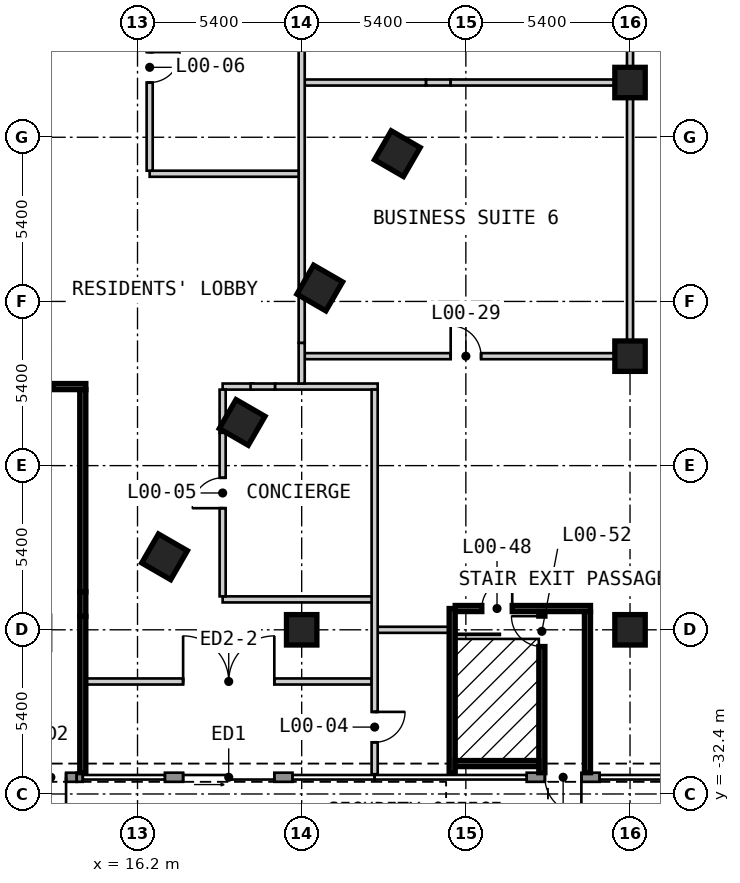
"""IFC4 building model, lengths in metres.
Left out: names, types, materials, properties, quantities, classifications, styles, units other than length and angle.
Written with IfcOpenShell. Run it as: python <this file> out.ifc"""

import sys

from ifc_helpers import new_model, si_unit, direction, frame, frame_2d, origin, origin_2d, place, context, subcontext, project, spatial, rectangle, extrude, element, fill, save


model = new_model("IFC4")
c1 = context("Model", 3, precision=1e-05, world=origin(), true_north=direction((0.0, 1.0)))
c2 = subcontext(c1, "Body", "Model", "MODEL_VIEW")
j1 = project(units=[si_unit("LENGTHUNIT", "METRE"), si_unit("PLANEANGLEUNIT", "RADIAN")], contexts=[c1])
p1 = place(None, origin())
s1 = spatial("IfcSite", under=j1, at=p1, CompositionType="ELEMENT")
p2 = place(p1, origin())
s2 = spatial("IfcBuilding", under=s1, at=p2, CompositionType="ELEMENT")
p3 = place(p2, origin())
s3 = spatial("IfcBuildingStorey", under=s2, at=p3, CompositionType="ELEMENT", Elevation=0.0)
for number, where, z_axis, x_axis in (
    (1, (17.09, -24.6, 0.0), (0.0, 0.0, 1.0), (0.5, 0.866, 0.0)),
    (2, (19.642, -20.18, 0.0), (0.0, 0.0, 1.0), (0.5, 0.866, 0.0)),
    (3, (22.194, -15.759, 0.0), (0.0, 0.0, 1.0), (0.5, 0.866, 0.0)),
    (4, (24.746, -11.339, 0.0), (0.0, 0.0, 1.0), (0.5, 0.866, 0.0)),
):
    element("IfcColumn", number, at=place(p3, frame(where, z_axis=z_axis, x_axis=x_axis)), inside=s3, PredefinedType="COLUMN", context=c2, shape_type="SweptSolid", body=[
        extrude(rectangle(XDim=1.1, YDim=1.1, at=origin_2d()), origin(), (0.0, 0.0, 1.0), 5.0),
    ])
for number, where, z_axis, x_axis in (
    (5, (21.6, -27.0, 0.0), (0.0, 0.0, 1.0), (1.0, 0.0, 0.0)),
    (6, (32.4, -27.0, 0.0), (0.0, 0.0, 1.0), (1.0, 0.0, 0.0)),
    (7, (32.4, -18.0, 0.0), (0.0, 0.0, 1.0), (1.0, 0.0, 0.0)),
    (8, (32.4, -9.0, 0.0), (0.0, 0.0, 1.0), (1.0, 0.0, 0.0)),
):
    element("IfcColumn", number, at=place(p3, frame(where, z_axis=z_axis, x_axis=x_axis)), inside=s3, PredefinedType="COLUMN", context=c2, shape_type="SweptSolid", body=[
        extrude(rectangle(XDim=1.0, YDim=1.0, at=origin_2d()), origin(), (0.0, 0.0, 1.0), 5.0),
    ])
p4 = place(p3, frame((12.5, -31.85, 0.0), z_axis=(0.0, 0.0, 1.0), x_axis=(1.0, 0.0, 0.0)))
e9 = element("IfcWall", 9, at=p4, inside=s3, PredefinedType="SOLIDWALL", context=c2, shape_type="SweptSolid", body=[
    extrude(rectangle(XDim=1.7, YDim=0.3, at=frame_2d((0.85, 0.0))), origin(), (0.0, 0.0, 1.0), 4.55),
])
p5 = place(p4, frame((1.35, 0.0, 0.0), z_axis=(0.0, 0.0, 1.0), x_axis=(-1.0, 0.0, 0.0)))
e10 = element("IfcOpeningElement", 10, at=p5, cuts=e9, PredefinedType="OPENING", context=c2, shape_type="SweptSolid", body=[
    extrude(rectangle(XDim=1.0, YDim=2.4, at=frame_2d((0.5, 1.2))), frame((0.0, 0.16, 0.0), z_axis=(0.0, -1.0, 0.0), x_axis=(1.0, 0.0, 0.0)), (0.0, 0.0, 1.0), 0.32),
])
p6 = place(p3, frame((14.2, -31.85, 0.0), z_axis=(0.0, 0.0, 1.0), x_axis=(1.0, 0.0, 0.0)))
e11 = element("IfcWall", 11, at=p6, inside=s3, PredefinedType="SOLIDWALL", context=c2, shape_type="SweptSolid", body=[
    extrude(rectangle(XDim=0.2, YDim=0.3, at=frame_2d((0.1, 0.0))), origin(), (0.0, 0.0, 1.0), 4.55),
])
p7 = place(p3, frame((17.1, -31.85, 0.0), z_axis=(0.0, 0.0, 1.0), x_axis=(1.0, 0.0, 0.0)))
e12 = element("IfcWall", 12, at=p7, inside=s3, PredefinedType="SOLIDWALL", context=c2, shape_type="SweptSolid", body=[
    extrude(rectangle(XDim=4.2, YDim=0.3, at=frame_2d((2.1, 0.0))), origin(), (0.0, 0.0, 1.0), 4.55),
])
p8 = place(p7, frame((0.6, 0.0, 0.0)))
e13 = element("IfcOpeningElement", 13, at=p8, cuts=e12, PredefinedType="OPENING", context=c2, shape_type="SweptSolid", body=[
    extrude(rectangle(XDim=3.0, YDim=2.4, at=frame_2d((1.5, 1.2))), frame((0.0, 0.16, 0.0), z_axis=(0.0, -1.0, 0.0), x_axis=(1.0, 0.0, 0.0)), (0.0, 0.0, 1.0), 0.32),
])
p9 = place(p3, frame((29.0, -31.85, 0.0), z_axis=(0.0, 0.0, 1.0), x_axis=(1.0, 0.0, 0.0)))
e14 = element("IfcWall", 14, at=p9, inside=s3, PredefinedType="SOLIDWALL", context=c2, shape_type="SweptSolid", body=[
    extrude(rectangle(XDim=2.4, YDim=0.3, at=frame_2d((1.2, 0.0))), origin(), (0.0, 0.0, 1.0), 4.55),
])
p10 = place(p9, frame((1.8, 0.0, 0.0), z_axis=(0.0, 0.0, 1.0), x_axis=(-1.0, 0.0, 0.0)))
e15 = element("IfcOpeningElement", 15, at=p10, cuts=e14, PredefinedType="OPENING", context=c2, shape_type="SweptSolid", body=[
    extrude(rectangle(XDim=1.2, YDim=2.4, at=frame_2d((0.6, 1.2))), frame((0.0, 0.16, 0.0), z_axis=(0.0, -1.0, 0.0), x_axis=(1.0, 0.0, 0.0)), (0.0, 0.0, 1.0), 0.32),
])
p11 = place(p3, frame((14.5, -28.7, 0.0), z_axis=(0.0, 0.0, 1.0), x_axis=(1.0, 0.0, 0.0)))
e16 = element("IfcWall", 16, at=p11, inside=s3, PredefinedType="PARTITIONING", context=c2, shape_type="SweptSolid", body=[
    extrude(rectangle(XDim=9.4, YDim=0.2, at=frame_2d((4.7, 0.0))), origin(), (0.0, 0.0, 1.0), 4.55),
])
p12 = place(p11, frame((3.2, 0.0, 0.0)))
e17 = element("IfcOpeningElement", 17, at=p12, cuts=e16, PredefinedType="OPENING", context=c2, shape_type="SweptSolid", body=[
    extrude(rectangle(XDim=3.0, YDim=2.1, at=frame_2d((1.5, 1.05))), frame((0.0, 0.11, 0.0), z_axis=(0.0, -1.0, 0.0), x_axis=(1.0, 0.0, 0.0)), (0.0, 0.0, 1.0), 0.22),
])
p13 = place(p3, frame((24.1, -27.0, 0.0), z_axis=(0.0, 0.0, 1.0), x_axis=(1.0, 0.0, 0.0)))
e18 = element("IfcWall", 18, at=p13, inside=s3, PredefinedType="PARTITIONING", context=c2, shape_type="SweptSolid", body=[
    extrude(rectangle(XDim=2.55, YDim=0.2, at=frame_2d((1.275, 0.0))), origin(), (0.0, 0.0, 1.0), 4.55),
])
p14 = place(p3, frame((26.65, -26.3, 0.0), z_axis=(0.0, 0.0, 1.0), x_axis=(1.0, 0.0, 0.0)))
e19 = element("IfcWall", 19, at=p14, inside=s3, PredefinedType="SOLIDWALL", context=c2, shape_type="SweptSolid", body=[
    extrude(rectangle(XDim=4.45, YDim=0.2, at=frame_2d((2.225, 0.0))), origin(), (0.0, 0.0, 1.0), 4.55),
])
p15 = place(p14, frame((1.875, 0.0, 0.0), z_axis=(0.0, 0.0, 1.0), x_axis=(-1.0, 0.0, 0.0)))
e20 = element("IfcOpeningElement", 20, at=p15, cuts=e19, PredefinedType="OPENING", context=c2, shape_type="SweptSolid", body=[
    extrude(rectangle(XDim=1.0, YDim=2.1, at=frame_2d((0.5, 1.05))), frame((0.0, 0.11, 0.0), z_axis=(0.0, -1.0, 0.0), x_axis=(1.0, 0.0, 0.0)), (0.0, 0.0, 1.0), 0.22),
])
p16 = place(p3, frame((19.0, -26.0, 0.0), z_axis=(0.0, 0.0, 1.0), x_axis=(1.0, 0.0, 0.0)))
e21 = element("IfcWall", 21, at=p16, inside=s3, PredefinedType="PARTITIONING", context=c2, shape_type="SweptSolid", body=[
    extrude(rectangle(XDim=5.0, YDim=0.2, at=frame_2d((2.5, 0.0))), origin(), (0.0, 0.0, 1.0), 4.55),
])
p17 = place(p3, frame((13.42, -19.0, 0.0), z_axis=(0.0, 0.0, 1.0), x_axis=(1.0, 0.0, 0.0)))
e22 = element("IfcWall", 22, at=p17, inside=s3, PredefinedType="SOLIDWALL", context=c2, shape_type="SweptSolid", body=[
    extrude(rectangle(XDim=1.08, YDim=0.2, at=frame_2d((0.54, 0.0))), origin(), (0.0, 0.0, 1.0), 4.55),
])
p18 = place(p3, frame((19.0, -19.0, 0.0), z_axis=(0.0, 0.0, 1.0), x_axis=(1.0, 0.0, 0.0)))
e23 = element("IfcWall", 23, at=p18, inside=s3, PredefinedType="PARTITIONING", context=c2, shape_type="SweptSolid", body=[
    extrude(rectangle(XDim=1.019, YDim=0.2, at=frame_2d((0.51, 0.0))), origin(), (0.0, 0.0, 1.0), 4.55),
])
p19 = place(p3, frame((19.919, -19.0, 0.0), z_axis=(0.0, 0.0, 1.0), x_axis=(1.0, 0.0, 0.0)))
e24 = element("IfcWall", 24, at=p19, inside=s3, PredefinedType="PARTITIONING", context=c2, shape_type="SweptSolid", body=[
    extrude(rectangle(XDim=0.808, YDim=0.2, at=frame_2d((0.404, 0.0))), origin(), (0.0, 0.0, 1.0), 3.82),
])
p20 = place(p3, frame((20.727, -19.0, 0.0), z_axis=(0.0, 0.0, 1.0), x_axis=(1.0, 0.0, 0.0)))
e25 = element("IfcWall", 25, at=p20, inside=s3, PredefinedType="PARTITIONING", context=c2, shape_type="SweptSolid", body=[
    extrude(rectangle(XDim=3.373, YDim=0.2, at=frame_2d((1.687, 0.0))), origin(), (0.0, 0.0, 1.0), 4.55),
])
p21 = place(p3, frame((21.7, -18.0, 0.0), z_axis=(0.0, 0.0, 1.0), x_axis=(1.0, 0.0, 0.0)))
e26 = element("IfcWall", 26, at=p21, inside=s3, PredefinedType="PARTITIONING", context=c2, shape_type="SweptSolid", body=[
    extrude(rectangle(XDim=10.8, YDim=0.2, at=frame_2d((5.4, 0.0))), origin(), (0.0, 0.0, 1.0), 4.55),
])
p22 = place(p21, frame((4.801, 0.0, 0.0)))
e27 = element("IfcOpeningElement", 27, at=p22, cuts=e26, PredefinedType="OPENING", context=c2, shape_type="SweptSolid", body=[
    extrude(rectangle(XDim=1.0, YDim=2.1, at=frame_2d((0.5, 1.05))), frame((0.0, 0.11, 0.0), z_axis=(0.0, -1.0, 0.0), x_axis=(1.0, 0.0, 0.0)), (0.0, 0.0, 1.0), 0.22),
])
p23 = place(p3, frame((16.6, -12.0, 0.0), z_axis=(0.0, 0.0, 1.0), x_axis=(1.0, 0.0, 0.0)))
e28 = element("IfcWall", 28, at=p23, inside=s3, PredefinedType="PARTITIONING", context=c2, shape_type="SweptSolid", body=[
    extrude(rectangle(XDim=5.0, YDim=0.2, at=frame_2d((2.5, 0.0))), origin(), (0.0, 0.0, 1.0), 4.55),
])
p24 = place(p3, frame((21.7, -9.0, 0.0), z_axis=(0.0, 0.0, 1.0), x_axis=(1.0, 0.0, 0.0)))
e29 = element("IfcWall", 29, at=p24, inside=s3, PredefinedType="PARTITIONING", context=c2, shape_type="SweptSolid", body=[
    extrude(rectangle(XDim=3.992, YDim=0.2, at=frame_2d((1.996, 0.0))), origin(), (0.0, 0.0, 1.0), 4.55),
])
p25 = place(p3, frame((25.692, -9.0, 0.0), z_axis=(0.0, 0.0, 1.0), x_axis=(1.0, 0.0, 0.0)))
e30 = element("IfcWall", 30, at=p25, inside=s3, PredefinedType="PARTITIONING", context=c2, shape_type="SweptSolid", body=[
    extrude(rectangle(XDim=0.809, YDim=0.2, at=frame_2d((0.405, 0.0))), origin(), (0.0, 0.0, 1.0), 3.82),
])
p26 = place(p3, frame((26.501, -9.0, 0.0), z_axis=(0.0, 0.0, 1.0), x_axis=(1.0, 0.0, 0.0)))
e31 = element("IfcWall", 31, at=p26, inside=s3, PredefinedType="PARTITIONING", context=c2, shape_type="SweptSolid", body=[
    extrude(rectangle(XDim=5.799, YDim=0.2, at=frame_2d((2.899, 0.0))), origin(), (0.0, 0.0, 1.0), 4.55),
])
p27 = place(p3, frame((14.4, -31.7, 0.0), z_axis=(0.0, 0.0, 1.0), x_axis=(0.0, 1.0, 0.0)))
e32 = element("IfcWall", 32, at=p27, inside=s3, PredefinedType="SOLIDWALL", context=c2, shape_type="SweptSolid", body=[
    extrude(rectangle(XDim=5.142, YDim=0.2, at=frame_2d((2.571, 0.0))), origin(), (0.0, 0.0, 1.0), 4.55),
])
p28 = place(p3, frame((14.4, -26.558, 0.0), z_axis=(0.0, 0.0, 1.0), x_axis=(0.0, 1.0, 0.0)))
e33 = element("IfcWall", 33, at=p28, inside=s3, PredefinedType="SOLIDWALL", context=c2, shape_type="SweptSolid", body=[
    extrude(rectangle(XDim=0.809, YDim=0.2, at=frame_2d((0.405, 0.0))), origin(), (0.0, 0.0, 1.0), 3.82),
])
p29 = place(p3, frame((14.4, -25.749, 0.0), z_axis=(0.0, 0.0, 1.0), x_axis=(0.0, 1.0, 0.0)))
e34 = element("IfcWall", 34, at=p29, inside=s3, PredefinedType="SOLIDWALL", context=c2, shape_type="SweptSolid", body=[
    extrude(rectangle(XDim=6.649, YDim=0.2, at=frame_2d((3.324, 0.0))), origin(), (0.0, 0.0, 1.0), 4.55),
])
p30 = place(p3, frame((16.6, -11.9, 0.0), z_axis=(0.0, 0.0, 1.0), x_axis=(0.0, 1.0, 0.0)))
e35 = element("IfcWall", 35, at=p30, inside=s3, PredefinedType="PARTITIONING", context=c2, shape_type="SweptSolid", body=[
    extrude(rectangle(XDim=6.8, YDim=0.2, at=frame_2d((3.4, 0.0))), origin(), (0.0, 0.0, 1.0), 4.55),
])
p31 = place(p30, frame((2.9, 0.0, 0.0)))
e36 = element("IfcOpeningElement", 36, at=p31, cuts=e35, PredefinedType="OPENING", context=c2, shape_type="SweptSolid", body=[
    extrude(rectangle(XDim=1.0, YDim=2.1, at=frame_2d((0.5, 1.05))), frame((0.0, 0.11, 0.0), z_axis=(0.0, -1.0, 0.0), x_axis=(1.0, 0.0, 0.0)), (0.0, 0.0, 1.0), 0.22),
])
p32 = place(p3, frame((19.0, -25.9, 0.0), z_axis=(0.0, 0.0, 1.0), x_axis=(0.0, 1.0, 0.0)))
e37 = element("IfcWall", 37, at=p32, inside=s3, PredefinedType="PARTITIONING", context=c2, shape_type="SweptSolid", body=[
    extrude(rectangle(XDim=2.9, YDim=0.2, at=frame_2d((1.45, 0.0))), origin(), (0.0, 0.0, 1.0), 4.55),
])
p33 = place(p3, frame((19.0, -23.0, 0.0), z_axis=(0.0, 0.0, 1.0), x_axis=(0.0, 1.0, 0.0)))
e38 = element("IfcWall", 38, at=p33, inside=s3, PredefinedType="PARTITIONING", context=c2, shape_type="SweptSolid", body=[
    extrude(rectangle(XDim=2.481, YDim=0.2, at=frame_2d((1.24, 0.0))), origin(), (0.0, 0.0, 1.0), 3.82),
])
p34 = place(p33, origin())
e39 = element("IfcOpeningElement", 39, at=p34, cuts=e38, PredefinedType="OPENING", context=c2, shape_type="SweptSolid", body=[
    extrude(rectangle(XDim=1.0, YDim=2.1, at=frame_2d((0.5, 1.05))), frame((0.0, 0.11, 0.0), z_axis=(0.0, -1.0, 0.0), x_axis=(1.0, 0.0, 0.0)), (0.0, 0.0, 1.0), 0.22),
])
p35 = place(p3, frame((19.0, -20.519, 0.0), z_axis=(0.0, 0.0, 1.0), x_axis=(0.0, 1.0, 0.0)))
e40 = element("IfcWall", 40, at=p35, inside=s3, PredefinedType="PARTITIONING", context=c2, shape_type="SweptSolid", body=[
    extrude(rectangle(XDim=1.419, YDim=0.2, at=frame_2d((0.709, 0.0))), origin(), (0.0, 0.0, 1.0), 4.55),
])
p36 = place(p3, frame((21.6, -18.9, 0.0), z_axis=(0.0, 0.0, 1.0), x_axis=(0.0, 1.0, 0.0)))
e41 = element("IfcWall", 41, at=p36, inside=s3, PredefinedType="PARTITIONING", context=c2, shape_type="SweptSolid", body=[
    extrude(rectangle(XDim=1.339, YDim=0.2, at=frame_2d((0.669, 0.0))), origin(), (0.0, 0.0, 1.0), 4.55),
])
p37 = place(p3, frame((21.6, -17.561, 0.0), z_axis=(0.0, 0.0, 1.0), x_axis=(0.0, 1.0, 0.0)))
e42 = element("IfcWall", 42, at=p37, inside=s3, PredefinedType="PARTITIONING", context=c2, shape_type="SweptSolid", body=[
    extrude(rectangle(XDim=1.546, YDim=0.2, at=frame_2d((0.773, 0.0))), origin(), (0.0, 0.0, 1.0), 3.82),
])
p38 = place(p3, frame((21.6, -16.015, 0.0), z_axis=(0.0, 0.0, 1.0), x_axis=(0.0, 1.0, 0.0)))
e43 = element("IfcWall", 43, at=p38, inside=s3, PredefinedType="PARTITIONING", context=c2, shape_type="SweptSolid", body=[
    extrude(rectangle(XDim=32.03, YDim=0.2, at=frame_2d((16.015, 0.0))), origin(), (0.0, 0.0, 1.0), 4.55),
])
p39 = place(p3, frame((24.0, -31.75, 0.0), z_axis=(0.0, 0.0, 1.0), x_axis=(0.0, 1.0, 0.0)))
e44 = element("IfcWall", 44, at=p39, inside=s3, PredefinedType="PARTITIONING", context=c2, shape_type="SweptSolid", body=[
    extrude(rectangle(XDim=12.65, YDim=0.2, at=frame_2d((6.325, 0.0))), origin(), (0.0, 0.0, 1.0), 4.55),
])
p40 = place(p39, frame((1.05, 0.0, 0.0)))
e45 = element("IfcOpeningElement", 45, at=p40, cuts=e44, PredefinedType="OPENING", context=c2, shape_type="SweptSolid", body=[
    extrude(rectangle(XDim=1.0, YDim=2.1, at=frame_2d((0.5, 1.05))), frame((0.0, 0.11, 0.0), z_axis=(0.0, -1.0, 0.0), x_axis=(1.0, 0.0, 0.0)), (0.0, 0.0, 1.0), 0.22),
])
p41 = place(p3, frame((26.55, -31.7, 0.0), z_axis=(0.0, 0.0, 1.0), x_axis=(0.0, 1.0, 0.0)))
e46 = element("IfcWall", 46, at=p41, inside=s3, PredefinedType="SOLIDWALL", context=c2, shape_type="SweptSolid", body=[
    extrude(rectangle(XDim=5.4, YDim=0.2, at=frame_2d((2.7, 0.0))), origin(), (0.0, 0.0, 1.0), 4.55),
])
p42 = place(p3, frame((29.5, -31.7, 0.0), z_axis=(0.0, 0.0, 1.0), x_axis=(0.0, 1.0, 0.0)))
e47 = element("IfcWall", 47, at=p42, inside=s3, PredefinedType="SOLIDWALL", context=c2, shape_type="SweptSolid", body=[
    extrude(rectangle(XDim=5.3, YDim=0.2, at=frame_2d((2.65, 0.0))), origin(), (0.0, 0.0, 1.0), 4.55),
])
p43 = place(p42, frame((5.15, 0.0, 0.0), z_axis=(0.0, 0.0, 1.0), x_axis=(-1.0, 0.0, 0.0)))
e48 = element("IfcOpeningElement", 48, at=p43, cuts=e47, PredefinedType="OPENING", context=c2, shape_type="SweptSolid", body=[
    extrude(rectangle(XDim=1.0, YDim=2.1, at=frame_2d((0.5, 1.05))), frame((0.0, 0.11, 0.0), z_axis=(0.0, -1.0, 0.0), x_axis=(1.0, 0.0, 0.0)), (0.0, 0.0, 1.0), 0.22),
])
p44 = place(p3, frame((31.0, -31.7, 0.0), z_axis=(0.0, 0.0, 1.0), x_axis=(0.0, 1.0, 0.0)))
e49 = element("IfcWall", 49, at=p44, inside=s3, PredefinedType="SOLIDWALL", context=c2, shape_type="SweptSolid", body=[
    extrude(rectangle(XDim=5.3, YDim=0.2, at=frame_2d((2.65, 0.0))), origin(), (0.0, 0.0, 1.0), 4.55),
])
p45 = place(p3, frame((32.4, -17.9, 0.0), z_axis=(0.0, 0.0, 1.0), x_axis=(0.0, 1.0, 0.0)))
e50 = element("IfcWall", 50, at=p45, inside=s3, PredefinedType="PARTITIONING", context=c2, shape_type="SweptSolid", body=[
    extrude(rectangle(XDim=17.8, YDim=0.2, at=frame_2d((8.9, 0.0))), origin(), (0.0, 0.0, 1.0), 4.55),
])
p46 = place(p3, frame((26.65, -31.4, 0.0), z_axis=(0.0, 0.0, 1.0), x_axis=(1.0, 0.0, 0.0)))
e51 = element("IfcWall", 51, at=p46, inside=s3, PredefinedType="SOLIDWALL", context=c2, shape_type="SweptSolid", body=[
    extrude(rectangle(XDim=2.75, YDim=0.2, at=frame_2d((1.375, 0.0))), origin(), (0.0, 0.0, 1.0), 4.55),
])
p47 = place(p5, origin())
e52 = element("IfcDoor", 52, at=p47, inside=s3, OperationType="SINGLE_SWING_RIGHT", PredefinedType="DOOR", context=c2, shape_type="SweptSolid", body=[
    extrude(rectangle(XDim=1.0, YDim=2.4, at=frame_2d((0.5, 1.2))), frame((0.0, 0.025, 0.0), z_axis=(0.0, -1.0, 0.0), x_axis=(1.0, 0.0, 0.0)), (0.0, 0.0, 1.0), 0.05),
])
fill(e10, e52)
p48 = place(p8, origin())
e53 = element("IfcDoor", 53, at=p48, inside=s3, OperationType="DOUBLE_DOOR_SLIDING", PredefinedType="DOOR", context=c2, shape_type="SweptSolid", body=[
    extrude(rectangle(XDim=3.0, YDim=2.4, at=frame_2d((1.5, 1.2))), frame((0.0, 0.025, 0.0), z_axis=(0.0, -1.0, 0.0), x_axis=(1.0, 0.0, 0.0)), (0.0, 0.0, 1.0), 0.05),
])
fill(e13, e53)
p49 = place(p10, origin())
e54 = element("IfcDoor", 54, at=p49, inside=s3, OperationType="SINGLE_SWING_RIGHT", PredefinedType="DOOR", context=c2, shape_type="SweptSolid", body=[
    extrude(rectangle(XDim=1.2, YDim=2.4, at=frame_2d((0.6, 1.2))), frame((0.0, 0.025, 0.0), z_axis=(0.0, -1.0, 0.0), x_axis=(1.0, 0.0, 0.0)), (0.0, 0.0, 1.0), 0.05),
])
fill(e15, e54)
p50 = place(p12, origin())
e55 = element("IfcDoor", 55, at=p50, inside=s3, OperationType="DOUBLE_DOOR_SINGLE_SWING", PredefinedType="DOOR", context=c2, shape_type="SweptSolid", body=[
    extrude(rectangle(XDim=3.0, YDim=2.1, at=frame_2d((1.5, 1.05))), frame((0.0, 0.025, 0.0), z_axis=(0.0, -1.0, 0.0), x_axis=(1.0, 0.0, 0.0)), (0.0, 0.0, 1.0), 0.05),
])
fill(e17, e55)
p51 = place(p40, origin())
e56 = element("IfcDoor", 56, at=p51, inside=s3, OperationType="SINGLE_SWING_RIGHT", PredefinedType="DOOR", context=c2, shape_type="SweptSolid", body=[
    extrude(rectangle(XDim=1.0, YDim=2.1, at=frame_2d((0.5, 1.05))), frame((0.0, 0.025, 0.0), z_axis=(0.0, -1.0, 0.0), x_axis=(1.0, 0.0, 0.0)), (0.0, 0.0, 1.0), 0.05),
])
fill(e45, e56)
p52 = place(p34, origin())
e57 = element("IfcDoor", 57, at=p52, inside=s3, OperationType="SINGLE_SWING_LEFT", PredefinedType="DOOR", context=c2, shape_type="SweptSolid", body=[
    extrude(rectangle(XDim=1.0, YDim=2.1, at=frame_2d((0.5, 1.05))), frame((0.0, 0.025, 0.0), z_axis=(0.0, -1.0, 0.0), x_axis=(1.0, 0.0, 0.0)), (0.0, 0.0, 1.0), 0.05),
])
fill(e39, e57)
p53 = place(p31, origin())
e58 = element("IfcDoor", 58, at=p53, inside=s3, OperationType="SINGLE_SWING_RIGHT", PredefinedType="DOOR", context=c2, shape_type="SweptSolid", body=[
    extrude(rectangle(XDim=1.0, YDim=2.1, at=frame_2d((0.5, 1.05))), frame((0.0, 0.025, 0.0), z_axis=(0.0, -1.0, 0.0), x_axis=(1.0, 0.0, 0.0)), (0.0, 0.0, 1.0), 0.05),
])
fill(e36, e58)
p54 = place(p22, origin())
e59 = element("IfcDoor", 59, at=p54, inside=s3, OperationType="SINGLE_SWING_LEFT", PredefinedType="DOOR", context=c2, shape_type="SweptSolid", body=[
    extrude(rectangle(XDim=1.0, YDim=2.1, at=frame_2d((0.5, 1.05))), frame((0.0, 0.025, 0.0), z_axis=(0.0, -1.0, 0.0), x_axis=(1.0, 0.0, 0.0)), (0.0, 0.0, 1.0), 0.05),
])
fill(e27, e59)
p55 = place(p15, origin())
e60 = element("IfcDoor", 60, at=p55, inside=s3, OperationType="SINGLE_SWING_LEFT", PredefinedType="DOOR", context=c2, shape_type="SweptSolid", body=[
    extrude(rectangle(XDim=1.0, YDim=2.1, at=frame_2d((0.5, 1.05))), frame((0.0, 0.025, 0.0), z_axis=(0.0, -1.0, 0.0), x_axis=(1.0, 0.0, 0.0)), (0.0, 0.0, 1.0), 0.05),
])
fill(e20, e60)
p56 = place(p43, origin())
e61 = element("IfcDoor", 61, at=p56, inside=s3, OperationType="SINGLE_SWING_LEFT", PredefinedType="DOOR", context=c2, shape_type="SweptSolid", body=[
    extrude(rectangle(XDim=1.0, YDim=2.1, at=frame_2d((0.5, 1.05))), frame((0.0, 0.025, 0.0), z_axis=(0.0, -1.0, 0.0), x_axis=(1.0, 0.0, 0.0)), (0.0, 0.0, 1.0), 0.05),
])
fill(e48, e61)
save(model, sys.argv[1])
